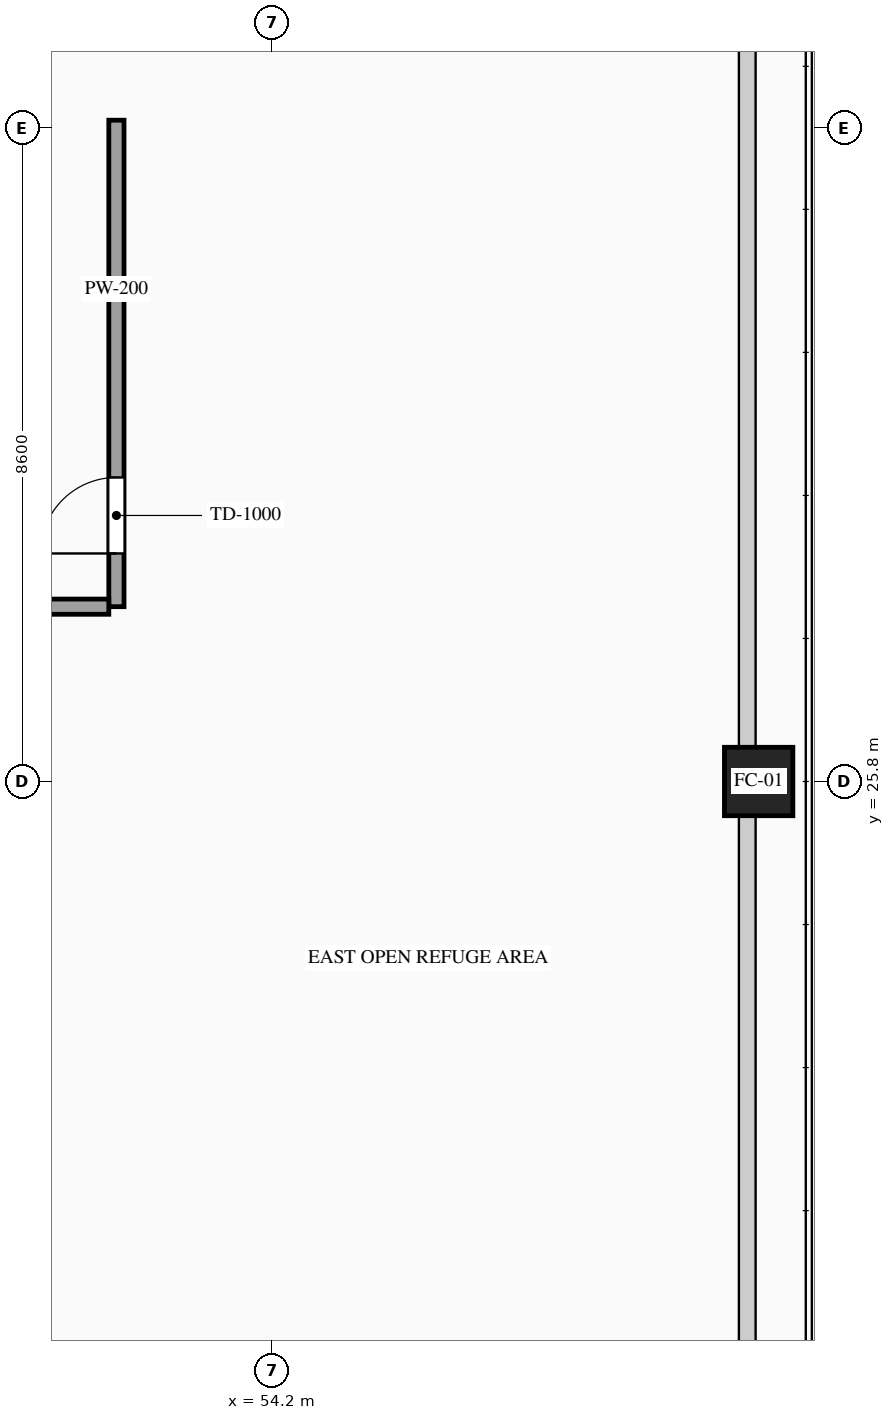
"""IFC4 building model, lengths in metres.
Left out: names, types, materials, properties, quantities, classifications, styles, units other than length and angle.
Written with IfcOpenShell. Run it as: python <this file> out.ifc"""

import sys

from ifc_helpers import new_model, si_unit, direction, frame, frame_2d, origin, origin_2d, place, context, subcontext, project, spatial, rectangle, hollow_rectangle, extrude, source, transform, mapped, element, fill, save


model = new_model("IFC4")
c1 = context("Model", 3, precision=1e-05, world=origin(), true_north=direction((0.0, 1.0)))
c2 = subcontext(c1, "Body", "Model", "MODEL_VIEW")
j1 = project(units=[si_unit("LENGTHUNIT", "METRE"), si_unit("PLANEANGLEUNIT", "RADIAN")], contexts=[c1])
p1 = place(None, origin())
s1 = spatial("IfcSite", under=j1, at=p1, CompositionType="ELEMENT")
p2 = place(p1, origin())
s2 = spatial("IfcBuilding", under=s1, at=p2, CompositionType="ELEMENT")
p3 = place(p2, frame((0.0, 0.0, 85.6)))
s3 = spatial("IfcBuildingStorey", under=s2, at=p3, CompositionType="ELEMENT", Elevation=85.6)
m1 = source(origin(), c2, "Body", "SweptSolid", [
    extrude(hollow_rectangle(XDim=0.9, YDim=0.9, WallThickness=0.042, at=origin_2d()), origin(), (0.0, 0.0, 1.0), 4.6),
])
p4 = place(p3, frame((60.6, 25.8, 0.0), z_axis=(0.0, 0.0, 1.0), x_axis=(1.0, 0.0, 0.0)))
e1 = element("IfcColumn", 1, at=p4, inside=s3, PredefinedType="COLUMN", context=c2, shape_type="MappedRepresentation", body=[
    mapped(m1, transform((0.0, 0.0, 0.0), scale=1.0)),
])
p5 = place(p3, frame((52.15, 28.1, 0.0), z_axis=(0.0, 0.0, 1.0), x_axis=(0.0, 1.0, 0.0)))
e2 = element("IfcWall", 2, at=p5, inside=s3, PredefinedType="PARTITIONING", context=c2, shape_type="SweptSolid", body=[
    extrude(rectangle(XDim=6.4, YDim=0.2, at=frame_2d((3.2, 0.0))), origin(), (0.0, 0.0, 1.0), 4.38),
])
p6 = place(p5, frame((0.7, 0.0, 0.0)))
e3 = element("IfcOpeningElement", 3, at=p6, cuts=e2, PredefinedType="OPENING", context=c2, shape_type="SweptSolid", body=[
    extrude(rectangle(XDim=1.0, YDim=2.2, at=frame_2d((0.5, 1.1))), frame((0.0, 0.115, 0.0), z_axis=(0.0, -1.0, 0.0), x_axis=(1.0, 0.0, 0.0)), (0.0, 0.0, 1.0), 0.23),
])
m2 = source(origin(), c2, "Body", "SweptSolid", [
    extrude(rectangle(XDim=1.455, YDim=0.2, at=frame_2d((0.728, 0.0))), origin(), (0.0, 0.0, 1.0), 4.38),
])
p7 = place(p3, frame((50.595, 28.1, 0.0), z_axis=(0.0, 0.0, 1.0), x_axis=(1.0, 0.0, 0.0)))
e4 = element("IfcWall", 4, at=p7, inside=s3, PredefinedType="PARTITIONING", context=c2, shape_type="MappedRepresentation", body=[
    mapped(m2, transform((0.0, 0.0, 0.0), scale=1.0)),
])
m3 = source(origin(), c2, "Body", "SweptSolid", [
    extrude(rectangle(XDim=1.0, YDim=2.2, at=frame_2d((0.5, 1.1))), frame((0.0, 0.025, 0.0), z_axis=(0.0, -1.0, 0.0), x_axis=(1.0, 0.0, 0.0)), (0.0, 0.0, 1.0), 0.05),
])
p8 = place(p6, origin())
e5 = element("IfcDoor", 5, at=p8, inside=s3, OperationType="SINGLE_SWING_LEFT", PredefinedType="DOOR", context=c2, shape_type="MappedRepresentation", body=[
    mapped(m3, transform((0.0, 0.0, 0.0), scale=1.0)),
])
fill(e3, e5)
save(model, sys.argv[1])
